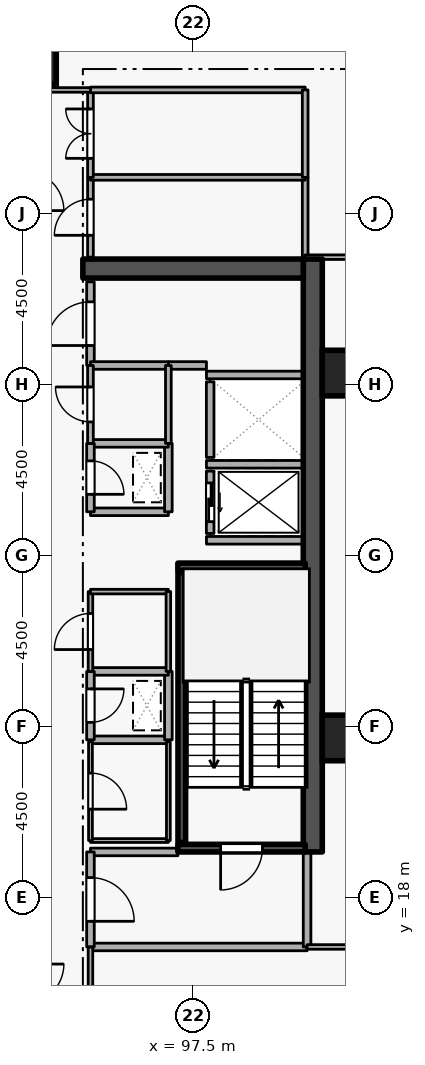
"""IFC4 building model, lengths in metres.
Left out: names, types, materials, properties, quantities, classifications, styles, units other than length and angle.
Written with IfcOpenShell. Run it as: python <this file> out.ifc"""

import sys

from ifc_helpers import new_model, si_unit, direction, frame, frame_2d, origin, origin_2d, place, context, subcontext, project, spatial, rectangle, extrude, element, fill, save


model = new_model("IFC4")
c1 = context("Model", 3, precision=1e-05, world=origin(), true_north=direction((0.0, 1.0)))
c2 = subcontext(c1, "Body", "Model", "MODEL_VIEW")
j1 = project(units=[si_unit("LENGTHUNIT", "METRE"), si_unit("PLANEANGLEUNIT", "RADIAN")], contexts=[c1])
p1 = place(None, origin())
s1 = spatial("IfcSite", under=j1, at=p1, CompositionType="ELEMENT")
p2 = place(p1, origin())
s2 = spatial("IfcBuilding", under=s1, at=p2, CompositionType="ELEMENT")
p3 = place(p2, frame((0.0, 0.0, 130.5)))
s3 = spatial("IfcBuildingStorey", under=s2, at=p3, CompositionType="ELEMENT", Elevation=130.5)
p4 = place(p3, frame((100.65, 19.2, 0.0), z_axis=(0.0, 0.0, 1.0), x_axis=(0.0, 1.0, 0.0)))
e1 = element("IfcWall", 1, at=p4, inside=s3, PredefinedType="SHEAR", context=c2, shape_type="SweptSolid", body=[
    extrude(rectangle(XDim=15.6, YDim=0.5, at=frame_2d((7.8, 0.0))), origin(), (0.0, 0.0, 1.0), 3.6),
])
p5 = place(p3, frame((94.6, 34.55, 0.0), z_axis=(0.0, 0.0, 1.0), x_axis=(1.0, 0.0, 0.0)))
e2 = element("IfcWall", 2, at=p5, inside=s3, PredefinedType="SHEAR", context=c2, shape_type="SweptSolid", body=[
    extrude(rectangle(XDim=5.8, YDim=0.5, at=frame_2d((2.9, 0.0))), origin(), (0.0, 0.0, 1.0), 3.6),
])
for number, where, z_axis, x_axis in (
    (3, (93.3, 40.0, 0.0), (0.0, 0.0, 1.0), (1.0, 0.0, 0.0)),
    (4, (101.5, 22.2, 0.0), (0.0, 0.0, 1.0), (1.0, 0.0, 0.0)),
    (5, (101.5, 31.8, 0.0), (0.0, 0.0, 1.0), (1.0, 0.0, 0.0)),
):
    element("IfcColumn", number, at=place(p3, frame(where, z_axis=z_axis, x_axis=x_axis)), inside=s3, PredefinedType="COLUMN", context=c2, shape_type="SweptSolid", body=[
        extrude(rectangle(XDim=1.2, YDim=1.2, at=origin_2d()), origin(), (0.0, 0.0, 1.0), 3.6),
    ])
p6 = place(p3, frame((97.95, 29.22, 0.0), z_axis=(0.0, 0.0, 1.0), x_axis=(0.0, -1.0, 0.0)))
e6 = element("IfcWall", 6, at=p6, inside=s3, PredefinedType="STANDARD", context=c2, shape_type="SweptSolid", body=[
    extrude(rectangle(XDim=1.64, YDim=0.2, at=frame_2d((0.82, 0.0))), origin(), (0.0, 0.0, 1.0), 3.34),
])
p7 = place(p6, frame((0.31, 0.0, 0.0)))
e7 = element("IfcOpeningElement", 7, at=p7, cuts=e6, PredefinedType="OPENING", context=c2, shape_type="SweptSolid", body=[
    extrude(rectangle(XDim=1.02, YDim=2.06, at=frame_2d((0.51, 1.03))), frame((0.0, 0.11, 0.0), z_axis=(0.0, -1.0, 0.0), x_axis=(1.0, 0.0, 0.0)), (0.0, 0.0, 1.0), 0.22),
])
p8 = place(p3, frame((97.95, 31.57, 0.0), z_axis=(0.0, 0.0, 1.0), x_axis=(0.0, -1.0, 0.0)))
e8 = element("IfcWall", 8, at=p8, inside=s3, PredefinedType="STANDARD", context=c2, shape_type="SweptSolid", body=[
    extrude(rectangle(XDim=1.99, YDim=0.2, at=frame_2d((0.995, 0.0))), origin(), (0.0, 0.0, 1.0), 3.34),
])
for number, where, z_axis, x_axis in (
    (9, (97.852, 29.4, 0.0), (0.0, 0.0, 1.0), (1.0, 0.0, 0.0)),
    (10, (97.852, 27.4, 0.0), (0.0, 0.0, 1.0), (1.0, 0.0, 0.0)),
    (11, (97.852, 31.75, 0.0), (0.0, 0.0, 1.0), (1.0, 0.0, 0.0)),
):
    element("IfcWall", number, at=place(p3, frame(where, z_axis=z_axis, x_axis=x_axis)), inside=s3, PredefinedType="STANDARD", context=c2, shape_type="SweptSolid", body=[
        extrude(rectangle(XDim=2.536, YDim=0.2, at=frame_2d((1.268, 0.0))), origin(), (0.0, 0.0, 1.0), 3.34),
    ])
p9 = place(p3, frame((100.45, 19.3, 0.0), z_axis=(0.0, 0.0, 1.0), x_axis=(-1.0, 0.0, 0.0)))
e12 = element("IfcWall", 12, at=p9, inside=s3, PredefinedType="SHEAR", context=c2, shape_type="SweptSolid", body=[
    extrude(rectangle(XDim=3.35, YDim=0.2, at=frame_2d((1.675, 0.0))), origin(), (0.0, 0.0, 1.0), 3.6),
])
p10 = place(p9, frame((1.125, 0.0, 0.0)))
e13 = element("IfcOpeningElement", 13, at=p10, cuts=e12, PredefinedType="OPENING", context=c2, shape_type="SweptSolid", body=[
    extrude(rectangle(XDim=1.1, YDim=2.1, at=frame_2d((0.55, 1.05))), frame((0.0, 0.11, 0.0), z_axis=(0.0, -1.0, 0.0), x_axis=(1.0, 0.0, 0.0)), (0.0, 0.0, 1.0), 0.22),
])
p11 = place(p3, frame((97.1, 26.7, 0.0), z_axis=(0.0, 0.0, 1.0), x_axis=(1.0, 0.0, 0.0)))
e14 = element("IfcWall", 14, at=p11, inside=s3, PredefinedType="SHEAR", context=c2, shape_type="SweptSolid", body=[
    extrude(rectangle(XDim=3.35, YDim=0.2, at=frame_2d((1.675, 0.0))), origin(), (0.0, 0.0, 1.0), 3.6),
])
p12 = place(p3, frame((97.203, 26.55, 0.0), z_axis=(0.0, 0.0, 1.0), x_axis=(0.0, -1.0, 0.0)))
e15 = element("IfcWall", 15, at=p12, inside=s3, PredefinedType="SHEAR", context=c2, shape_type="SweptSolid", body=[
    extrude(rectangle(XDim=7.1, YDim=0.2, at=frame_2d((3.55, 0.0))), origin(), (0.0, 0.0, 1.0), 3.6),
])
p13 = place(p3, frame((94.8, 16.7, 0.0), z_axis=(0.0, 0.0, 1.0), x_axis=(1.0, 0.0, 0.0)))
e16 = element("IfcWall", 16, at=p13, inside=s3, PredefinedType="STANDARD", context=c2, shape_type="SweptSolid", body=[
    extrude(rectangle(XDim=5.7, YDim=0.2, at=frame_2d((2.85, 0.0))), origin(), (0.0, 0.0, 1.0), 3.34),
])
p14 = place(p3, frame((100.5, 16.7, 0.0), z_axis=(0.0, 0.0, 1.0), x_axis=(0.0, 1.0, 0.0)))
e17 = element("IfcWall", 17, at=p14, inside=s3, PredefinedType="STANDARD", context=c2, shape_type="SweptSolid", body=[
    extrude(rectangle(XDim=2.5, YDim=0.2, at=frame_2d((1.25, 0.0))), origin(), (0.0, 0.0, 1.0), 3.34),
])
p15 = place(p3, frame((97.1, 19.2, 0.0), z_axis=(0.0, 0.0, 1.0), x_axis=(-1.0, 0.0, 0.0)))
e18 = element("IfcWall", 18, at=p15, inside=s3, PredefinedType="STANDARD", context=c2, shape_type="SweptSolid", body=[
    extrude(rectangle(XDim=2.3, YDim=0.2, at=frame_2d((1.15, 0.0))), origin(), (0.0, 0.0, 1.0), 2.545),
])
p16 = place(p3, frame((94.8, 19.2, 0.0), z_axis=(0.0, 0.0, 1.0), x_axis=(0.0, -1.0, 0.0)))
e19 = element("IfcWall", 19, at=p16, inside=s3, PredefinedType="STANDARD", context=c2, shape_type="SweptSolid", body=[
    extrude(rectangle(XDim=2.5, YDim=0.2, at=frame_2d((1.25, 0.0))), origin(), (0.0, 0.0, 1.0), 3.34),
])
p17 = place(p16, frame((0.675, 0.0, 0.0)))
e20 = element("IfcOpeningElement", 20, at=p17, cuts=e19, PredefinedType="OPENING", context=c2, shape_type="SweptSolid", body=[
    extrude(rectangle(XDim=1.15, YDim=2.1, at=frame_2d((0.575, 1.05))), frame((0.0, 0.11, 0.0), z_axis=(0.0, -1.0, 0.0), x_axis=(1.0, 0.0, 0.0)), (0.0, 0.0, 1.0), 0.22),
])
p18 = place(p3, frame((94.8, 28.15, 0.0), z_axis=(0.0, 0.0, 1.0), x_axis=(1.0, 0.0, 0.0)))
e21 = element("IfcWall", 21, at=p18, inside=s3, PredefinedType="STANDARD", context=c2, shape_type="SweptSolid", body=[
    extrude(rectangle(XDim=2.05, YDim=0.2, at=frame_2d((1.025, 0.0))), origin(), (0.0, 0.0, 1.0), 3.34),
])
p19 = place(p3, frame((96.85, 28.15, 0.0), z_axis=(0.0, 0.0, 1.0), x_axis=(0.0, 1.0, 0.0)))
e22 = element("IfcWall", 22, at=p19, inside=s3, PredefinedType="STANDARD", context=c2, shape_type="SweptSolid", body=[
    extrude(rectangle(XDim=1.8, YDim=0.2, at=frame_2d((0.9, 0.0))), origin(), (0.0, 0.0, 1.0), 3.34),
])
p20 = place(p3, frame((96.85, 29.95, 0.0), z_axis=(0.0, 0.0, 1.0), x_axis=(-1.0, 0.0, 0.0)))
e23 = element("IfcWall", 23, at=p20, inside=s3, PredefinedType="STANDARD", context=c2, shape_type="SweptSolid", body=[
    extrude(rectangle(XDim=2.05, YDim=0.2, at=frame_2d((1.025, 0.0))), origin(), (0.0, 0.0, 1.0), 3.34),
])
p21 = place(p3, frame((94.8, 29.95, 0.0), z_axis=(0.0, 0.0, 1.0), x_axis=(0.0, -1.0, 0.0)))
e24 = element("IfcWall", 24, at=p21, inside=s3, PredefinedType="STANDARD", context=c2, shape_type="SweptSolid", body=[
    extrude(rectangle(XDim=1.8, YDim=0.2, at=frame_2d((0.9, 0.0))), origin(), (0.0, 0.0, 1.0), 3.34),
])
p22 = place(p21, frame((0.46, 0.0, 0.0)))
e25 = element("IfcOpeningElement", 25, at=p22, cuts=e24, PredefinedType="OPENING", context=c2, shape_type="SweptSolid", body=[
    extrude(rectangle(XDim=0.88, YDim=2.04, at=frame_2d((0.44, 1.02))), frame((0.0, 0.11, 0.0), z_axis=(0.0, -1.0, 0.0), x_axis=(1.0, 0.0, 0.0)), (0.0, 0.0, 1.0), 0.22),
])
p23 = place(p3, frame((94.8, 22.15, 0.0), z_axis=(0.0, 0.0, 1.0), x_axis=(1.0, 0.0, 0.0)))
e26 = element("IfcWall", 26, at=p23, inside=s3, PredefinedType="STANDARD", context=c2, shape_type="SweptSolid", body=[
    extrude(rectangle(XDim=2.05, YDim=0.2, at=frame_2d((1.025, 0.0))), origin(), (0.0, 0.0, 1.0), 3.34),
])
p24 = place(p3, frame((96.85, 22.15, 0.0), z_axis=(0.0, 0.0, 1.0), x_axis=(0.0, 1.0, 0.0)))
e27 = element("IfcWall", 27, at=p24, inside=s3, PredefinedType="STANDARD", context=c2, shape_type="SweptSolid", body=[
    extrude(rectangle(XDim=1.8, YDim=0.2, at=frame_2d((0.9, 0.0))), origin(), (0.0, 0.0, 1.0), 3.34),
])
p25 = place(p3, frame((96.85, 23.95, 0.0), z_axis=(0.0, 0.0, 1.0), x_axis=(-1.0, 0.0, 0.0)))
e28 = element("IfcWall", 28, at=p25, inside=s3, PredefinedType="STANDARD", context=c2, shape_type="SweptSolid", body=[
    extrude(rectangle(XDim=2.05, YDim=0.2, at=frame_2d((1.025, 0.0))), origin(), (0.0, 0.0, 1.0), 3.34),
])
p26 = place(p3, frame((94.8, 23.95, 0.0), z_axis=(0.0, 0.0, 1.0), x_axis=(0.0, -1.0, 0.0)))
e29 = element("IfcWall", 29, at=p26, inside=s3, PredefinedType="STANDARD", context=c2, shape_type="SweptSolid", body=[
    extrude(rectangle(XDim=1.8, YDim=0.2, at=frame_2d((0.9, 0.0))), origin(), (0.0, 0.0, 1.0), 3.34),
])
p27 = place(p26, frame((0.46, 0.0, 0.0)))
e30 = element("IfcOpeningElement", 30, at=p27, cuts=e29, PredefinedType="OPENING", context=c2, shape_type="SweptSolid", body=[
    extrude(rectangle(XDim=0.88, YDim=2.04, at=frame_2d((0.44, 1.02))), frame((0.0, 0.11, 0.0), z_axis=(0.0, -1.0, 0.0), x_axis=(1.0, 0.0, 0.0)), (0.0, 0.0, 1.0), 0.22),
])
p28 = place(p3, frame((94.8, 32.0, 0.0), z_axis=(0.0, 0.0, 1.0), x_axis=(0.0, 1.0, 0.0)))
e31 = element("IfcWall", 31, at=p28, inside=s3, PredefinedType="STANDARD", context=c2, shape_type="SweptSolid", body=[
    extrude(rectangle(XDim=2.2, YDim=0.2, at=frame_2d((1.1, 0.0))), origin(), (0.0, 0.0, 1.0), 3.34),
])
p29 = place(p28, frame((0.525, 0.0, 0.0)))
e32 = element("IfcOpeningElement", 32, at=p29, cuts=e31, PredefinedType="OPENING", context=c2, shape_type="SweptSolid", body=[
    extrude(rectangle(XDim=1.15, YDim=2.1, at=frame_2d((0.575, 1.05))), frame((0.0, 0.11, 0.0), z_axis=(0.0, -1.0, 0.0), x_axis=(1.0, 0.0, 0.0)), (0.0, 0.0, 1.0), 0.22),
])
p30 = place(p3, frame((97.852, 32.0, 0.0), z_axis=(0.0, 0.0, 1.0), x_axis=(-1.0, 0.0, 0.0)))
e33 = element("IfcWall", 33, at=p30, inside=s3, PredefinedType="STANDARD", context=c2, shape_type="SweptSolid", body=[
    extrude(rectangle(XDim=1.002, YDim=0.2, at=frame_2d((0.501, 0.0))), origin(), (0.0, 0.0, 1.0), 3.34),
])
p31 = place(p3, frame((96.85, 32.0, 0.0), z_axis=(0.0, 0.0, 1.0), x_axis=(-1.0, 0.0, 0.0)))
e34 = element("IfcWall", 34, at=p31, inside=s3, PredefinedType="STANDARD", context=c2, shape_type="SweptSolid", body=[
    extrude(rectangle(XDim=2.05, YDim=0.2, at=frame_2d((1.025, 0.0))), origin(), (0.0, 0.0, 1.0), 3.34),
])
p32 = place(p3, frame((94.8, 19.5, 0.0), z_axis=(0.0, 0.0, 1.0), x_axis=(1.0, 0.0, 0.0)))
e35 = element("IfcWall", 35, at=p32, inside=s3, PredefinedType="PARTITIONING", context=c2, shape_type="SweptSolid", body=[
    extrude(rectangle(XDim=2.05, YDim=0.1, at=frame_2d((1.025, 0.0))), origin(), (0.0, 0.0, 1.0), 2.545),
])
p33 = place(p3, frame((96.85, 19.5, 0.0), z_axis=(0.0, 0.0, 1.0), x_axis=(0.0, 1.0, 0.0)))
e36 = element("IfcWall", 36, at=p33, inside=s3, PredefinedType="PARTITIONING", context=c2, shape_type="SweptSolid", body=[
    extrude(rectangle(XDim=2.6, YDim=0.1, at=frame_2d((1.3, 0.0))), origin(), (0.0, 0.0, 1.0), 3.34),
])
p34 = place(p3, frame((94.8, 22.1, 0.0), z_axis=(0.0, 0.0, 1.0), x_axis=(0.0, -1.0, 0.0)))
e37 = element("IfcWall", 37, at=p34, inside=s3, PredefinedType="PARTITIONING", context=c2, shape_type="SweptSolid", body=[
    extrude(rectangle(XDim=2.6, YDim=0.1, at=frame_2d((1.3, 0.0))), origin(), (0.0, 0.0, 1.0), 3.34),
])
p35 = place(p34, frame((0.825, 0.0, 0.0)))
e38 = element("IfcOpeningElement", 38, at=p35, cuts=e37, PredefinedType="OPENING", context=c2, shape_type="SweptSolid", body=[
    extrude(rectangle(XDim=0.95, YDim=2.1, at=frame_2d((0.475, 1.05))), frame((0.0, 0.06, 0.0), z_axis=(0.0, -1.0, 0.0), x_axis=(1.0, 0.0, 0.0)), (0.0, 0.0, 1.0), 0.12),
])
p36 = place(p3, frame((94.8, 23.95, 0.0), z_axis=(0.0, 0.0, 1.0), x_axis=(0.0, 1.0, 0.0)))
e39 = element("IfcWall", 39, at=p36, inside=s3, PredefinedType="PARTITIONING", context=c2, shape_type="SweptSolid", body=[
    extrude(rectangle(XDim=2.1, YDim=0.12, at=frame_2d((1.05, 0.0))), origin(), (0.0, 0.0, 1.0), 3.34),
])
p37 = place(p36, frame((0.575, 0.0, 0.0)))
e40 = element("IfcOpeningElement", 40, at=p37, cuts=e39, PredefinedType="OPENING", context=c2, shape_type="SweptSolid", body=[
    extrude(rectangle(XDim=0.95, YDim=2.1, at=frame_2d((0.475, 1.05))), frame((0.0, 0.07, 0.0), z_axis=(0.0, -1.0, 0.0), x_axis=(1.0, 0.0, 0.0)), (0.0, 0.0, 1.0), 0.14),
])
p38 = place(p3, frame((94.8, 26.05, 0.0), z_axis=(0.0, 0.0, 1.0), x_axis=(1.0, 0.0, 0.0)))
e41 = element("IfcWall", 41, at=p38, inside=s3, PredefinedType="PARTITIONING", context=c2, shape_type="SweptSolid", body=[
    extrude(rectangle(XDim=2.05, YDim=0.12, at=frame_2d((1.025, 0.0))), origin(), (0.0, 0.0, 1.0), 3.34),
])
p39 = place(p3, frame((96.85, 26.05, 0.0), z_axis=(0.0, 0.0, 1.0), x_axis=(0.0, -1.0, 0.0)))
e42 = element("IfcWall", 42, at=p39, inside=s3, PredefinedType="PARTITIONING", context=c2, shape_type="SweptSolid", body=[
    extrude(rectangle(XDim=2.1, YDim=0.12, at=frame_2d((1.05, 0.0))), origin(), (0.0, 0.0, 1.0), 3.34),
])
p40 = place(p3, frame((94.8, 29.95, 0.0), z_axis=(0.0, 0.0, 1.0), x_axis=(0.0, 1.0, 0.0)))
e43 = element("IfcWall", 43, at=p40, inside=s3, PredefinedType="PARTITIONING", context=c2, shape_type="SweptSolid", body=[
    extrude(rectangle(XDim=2.05, YDim=0.15, at=frame_2d((1.025, 0.0))), origin(), (0.0, 0.0, 1.0), 3.34),
])
p41 = place(p40, frame((0.565, 0.0, 0.0)))
e44 = element("IfcOpeningElement", 44, at=p41, cuts=e43, PredefinedType="OPENING", context=c2, shape_type="SweptSolid", body=[
    extrude(rectangle(XDim=0.92, YDim=2.08, at=frame_2d((0.46, 1.04))), frame((0.0, 0.085, 0.0), z_axis=(0.0, -1.0, 0.0), x_axis=(1.0, 0.0, 0.0)), (0.0, 0.0, 1.0), 0.17),
])
p42 = place(p3, frame((96.85, 32.0, 0.0), z_axis=(0.0, 0.0, 1.0), x_axis=(0.0, -1.0, 0.0)))
e45 = element("IfcWall", 45, at=p42, inside=s3, PredefinedType="PARTITIONING", context=c2, shape_type="SweptSolid", body=[
    extrude(rectangle(XDim=2.05, YDim=0.15, at=frame_2d((1.025, 0.0))), origin(), (0.0, 0.0, 1.0), 3.34),
])
p43 = place(p3, frame((100.45, 36.95, 0.0), z_axis=(0.0, 0.0, 1.0), x_axis=(0.0, -1.0, 0.0)))
e46 = element("IfcWall", 46, at=p43, inside=s3, PredefinedType="PARTITIONING", context=c2, shape_type="SweptSolid", body=[
    extrude(rectangle(XDim=2.1, YDim=0.15, at=frame_2d((1.05, 0.0))), origin(), (0.0, 0.0, 1.0), 3.34),
])
p44 = place(p3, frame((94.8, 34.85, 0.0), z_axis=(0.0, 0.0, 1.0), x_axis=(0.0, 1.0, 0.0)))
e47 = element("IfcWall", 47, at=p44, inside=s3, PredefinedType="PARTITIONING", context=c2, shape_type="SweptSolid", body=[
    extrude(rectangle(XDim=2.1, YDim=0.15, at=frame_2d((1.05, 0.0))), origin(), (0.0, 0.0, 1.0), 3.34),
])
p45 = place(p44, frame((0.575, 0.0, 0.0)))
e48 = element("IfcOpeningElement", 48, at=p45, cuts=e47, PredefinedType="OPENING", context=c2, shape_type="SweptSolid", body=[
    extrude(rectangle(XDim=0.95, YDim=2.1, at=frame_2d((0.475, 1.05))), frame((0.0, 0.085, 0.0), z_axis=(0.0, -1.0, 0.0), x_axis=(1.0, 0.0, 0.0)), (0.0, 0.0, 1.0), 0.17),
])
p46 = place(p3, frame((94.8, 36.95, 0.0), z_axis=(0.0, 0.0, 1.0), x_axis=(1.0, 0.0, 0.0)))
e49 = element("IfcWall", 49, at=p46, inside=s3, PredefinedType="PARTITIONING", context=c2, shape_type="SweptSolid", body=[
    extrude(rectangle(XDim=5.65, YDim=0.15, at=frame_2d((2.825, 0.0))), origin(), (0.0, 0.0, 1.0), 3.34),
])
p47 = place(p3, frame((94.8, 36.95, 0.0), z_axis=(0.0, 0.0, 1.0), x_axis=(0.0, 1.0, 0.0)))
e50 = element("IfcWall", 50, at=p47, inside=s3, PredefinedType="PARTITIONING", context=c2, shape_type="SweptSolid", body=[
    extrude(rectangle(XDim=2.3, YDim=0.15, at=frame_2d((1.15, 0.0))), origin(), (0.0, 0.0, 1.0), 3.34),
])
p48 = place(p47, frame((0.5, 0.0, 0.0)))
e51 = element("IfcOpeningElement", 51, at=p48, cuts=e50, PredefinedType="OPENING", context=c2, shape_type="SweptSolid", body=[
    extrude(rectangle(XDim=1.3, YDim=2.12, at=frame_2d((0.65, 1.06))), frame((0.0, 0.085, 0.0), z_axis=(0.0, -1.0, 0.0), x_axis=(1.0, 0.0, 0.0)), (0.0, 0.0, 1.0), 0.17),
])
p49 = place(p3, frame((94.8, 39.25, 0.0), z_axis=(0.0, 0.0, 1.0), x_axis=(1.0, 0.0, 0.0)))
e52 = element("IfcWall", 52, at=p49, inside=s3, PredefinedType="PARTITIONING", context=c2, shape_type="SweptSolid", body=[
    extrude(rectangle(XDim=5.65, YDim=0.15, at=frame_2d((2.825, 0.0))), origin(), (0.0, 0.0, 1.0), 3.34),
])
p50 = place(p3, frame((100.45, 39.25, 0.0), z_axis=(0.0, 0.0, 1.0), x_axis=(0.0, -1.0, 0.0)))
e53 = element("IfcWall", 53, at=p50, inside=s3, PredefinedType="PARTITIONING", context=c2, shape_type="SweptSolid", body=[
    extrude(rectangle(XDim=2.3, YDim=0.15, at=frame_2d((1.15, 0.0))), origin(), (0.0, 0.0, 1.0), 3.34),
])
p51 = place(p3, frame((94.8, 14.75, 0.0), z_axis=(0.0, 0.0, 1.0), x_axis=(0.0, 1.0, 0.0)))
e54 = element("IfcWall", 54, at=p51, inside=s3, PredefinedType="PARTITIONING", context=c2, shape_type="SweptSolid", body=[
    extrude(rectangle(XDim=1.95, YDim=0.12, at=frame_2d((0.975, 0.0))), origin(), (0.0, 0.0, 1.0), 3.34),
])
p52 = place(p3, frame((100.5, 16.7, 0.0), z_axis=(0.0, 0.0, 1.0), x_axis=(1.0, 0.0, 0.0)))
e55 = element("IfcWall", 55, at=p52, inside=s3, PredefinedType="PARTITIONING", context=c2, shape_type="SweptSolid", body=[
    extrude(rectangle(XDim=11.72, YDim=0.12, at=frame_2d((5.86, 0.0))), origin(), (0.0, 0.0, 1.0), 3.34),
])
p53 = place(p3, frame((94.8, 39.25, 0.0), z_axis=(0.0, 0.0, 1.0), x_axis=(-1.0, 0.0, 0.0)))
e56 = element("IfcWall", 56, at=p53, inside=s3, PredefinedType="PARTITIONING", context=c2, shape_type="SweptSolid", body=[
    extrude(rectangle(XDim=1.75, YDim=0.12, at=frame_2d((0.875, 0.0))), origin(), (0.0, 0.0, 1.0), 3.34),
])
p54 = place(p3, frame((112.22, 34.85, 0.0), z_axis=(0.0, 0.0, 1.0), x_axis=(-1.0, 0.0, 0.0)))
e57 = element("IfcWall", 57, at=p54, inside=s3, PredefinedType="PARTITIONING", context=c2, shape_type="SweptSolid", body=[
    extrude(rectangle(XDim=11.77, YDim=0.12, at=frame_2d((5.885, 0.0))), origin(), (0.0, 0.0, 1.0), 2.545),
])
p55 = place(p7, origin())
e58 = element("IfcDoor", 58, at=p55, inside=s3, OperationType="SLIDING_TO_LEFT", PredefinedType="DOOR", context=c2, shape_type="SweptSolid", body=[
    extrude(rectangle(XDim=1.02, YDim=2.06, at=frame_2d((0.51, 1.03))), frame((0.0, 0.025, 0.0), z_axis=(0.0, -1.0, 0.0), x_axis=(1.0, 0.0, 0.0)), (0.0, 0.0, 1.0), 0.05),
])
fill(e7, e58)
p56 = place(p10, origin())
e59 = element("IfcDoor", 59, at=p56, inside=s3, OperationType="SINGLE_SWING_RIGHT", PredefinedType="DOOR", context=c2, shape_type="SweptSolid", body=[
    extrude(rectangle(XDim=1.1, YDim=2.1, at=frame_2d((0.55, 1.05))), frame((0.0, 0.025, 0.0), z_axis=(0.0, -1.0, 0.0), x_axis=(1.0, 0.0, 0.0)), (0.0, 0.0, 1.0), 0.05),
])
fill(e13, e59)
p57 = place(p17, origin())
e60 = element("IfcDoor", 60, at=p57, inside=s3, OperationType="SINGLE_SWING_RIGHT", PredefinedType="DOOR", context=c2, shape_type="SweptSolid", body=[
    extrude(rectangle(XDim=1.15, YDim=2.1, at=frame_2d((0.575, 1.05))), frame((0.0, 0.025, 0.0), z_axis=(0.0, -1.0, 0.0), x_axis=(1.0, 0.0, 0.0)), (0.0, 0.0, 1.0), 0.05),
])
fill(e20, e60)
p58 = place(p22, origin())
e61 = element("IfcDoor", 61, at=p58, inside=s3, OperationType="SINGLE_SWING_RIGHT", PredefinedType="DOOR", context=c2, shape_type="SweptSolid", body=[
    extrude(rectangle(XDim=0.88, YDim=2.04, at=frame_2d((0.44, 1.02))), frame((0.0, 0.025, 0.0), z_axis=(0.0, -1.0, 0.0), x_axis=(1.0, 0.0, 0.0)), (0.0, 0.0, 1.0), 0.05),
])
fill(e25, e61)
p59 = place(p27, origin())
e62 = element("IfcDoor", 62, at=p59, inside=s3, OperationType="SINGLE_SWING_LEFT", PredefinedType="DOOR", context=c2, shape_type="SweptSolid", body=[
    extrude(rectangle(XDim=0.88, YDim=2.04, at=frame_2d((0.44, 1.02))), frame((0.0, 0.025, 0.0), z_axis=(0.0, -1.0, 0.0), x_axis=(1.0, 0.0, 0.0)), (0.0, 0.0, 1.0), 0.05),
])
fill(e30, e62)
p60 = place(p35, origin())
e63 = element("IfcDoor", 63, at=p60, inside=s3, OperationType="SINGLE_SWING_RIGHT", PredefinedType="DOOR", context=c2, shape_type="SweptSolid", body=[
    extrude(rectangle(XDim=0.95, YDim=2.1, at=frame_2d((0.475, 1.05))), frame((0.0, 0.025, 0.0), z_axis=(0.0, -1.0, 0.0), x_axis=(1.0, 0.0, 0.0)), (0.0, 0.0, 1.0), 0.05),
])
fill(e38, e63)
p61 = place(p37, origin())
e64 = element("IfcDoor", 64, at=p61, inside=s3, OperationType="SINGLE_SWING_LEFT", PredefinedType="DOOR", context=c2, shape_type="SweptSolid", body=[
    extrude(rectangle(XDim=0.95, YDim=2.1, at=frame_2d((0.475, 1.05))), frame((0.0, 0.025, 0.0), z_axis=(0.0, -1.0, 0.0), x_axis=(1.0, 0.0, 0.0)), (0.0, 0.0, 1.0), 0.05),
])
fill(e40, e64)
p62 = place(p41, origin())
e65 = element("IfcDoor", 65, at=p62, inside=s3, OperationType="SINGLE_SWING_RIGHT", PredefinedType="DOOR", context=c2, shape_type="SweptSolid", body=[
    extrude(rectangle(XDim=0.92, YDim=2.08, at=frame_2d((0.46, 1.04))), frame((0.0, 0.025, 0.0), z_axis=(0.0, -1.0, 0.0), x_axis=(1.0, 0.0, 0.0)), (0.0, 0.0, 1.0), 0.05),
])
fill(e44, e65)
p63 = place(p29, origin())
e66 = element("IfcDoor", 66, at=p63, inside=s3, OperationType="SINGLE_SWING_LEFT", PredefinedType="DOOR", context=c2, shape_type="SweptSolid", body=[
    extrude(rectangle(XDim=1.15, YDim=2.1, at=frame_2d((0.575, 1.05))), frame((0.0, 0.025, 0.0), z_axis=(0.0, -1.0, 0.0), x_axis=(1.0, 0.0, 0.0)), (0.0, 0.0, 1.0), 0.05),
])
fill(e32, e66)
p64 = place(p45, origin())
e67 = element("IfcDoor", 67, at=p64, inside=s3, OperationType="SINGLE_SWING_LEFT", PredefinedType="DOOR", context=c2, shape_type="SweptSolid", body=[
    extrude(rectangle(XDim=0.95, YDim=2.1, at=frame_2d((0.475, 1.05))), frame((0.0, 0.025, 0.0), z_axis=(0.0, -1.0, 0.0), x_axis=(1.0, 0.0, 0.0)), (0.0, 0.0, 1.0), 0.05),
])
fill(e48, e67)
p65 = place(p48, origin())
e68 = element("IfcDoor", 68, at=p65, inside=s3, OperationType="DOUBLE_DOOR_SINGLE_SWING", PredefinedType="DOOR", context=c2, shape_type="SweptSolid", body=[
    extrude(rectangle(XDim=1.3, YDim=2.12, at=frame_2d((0.65, 1.06))), frame((0.0, 0.025, 0.0), z_axis=(0.0, -1.0, 0.0), x_axis=(1.0, 0.0, 0.0)), (0.0, 0.0, 1.0), 0.05),
])
fill(e51, e68)
save(model, sys.argv[1])
